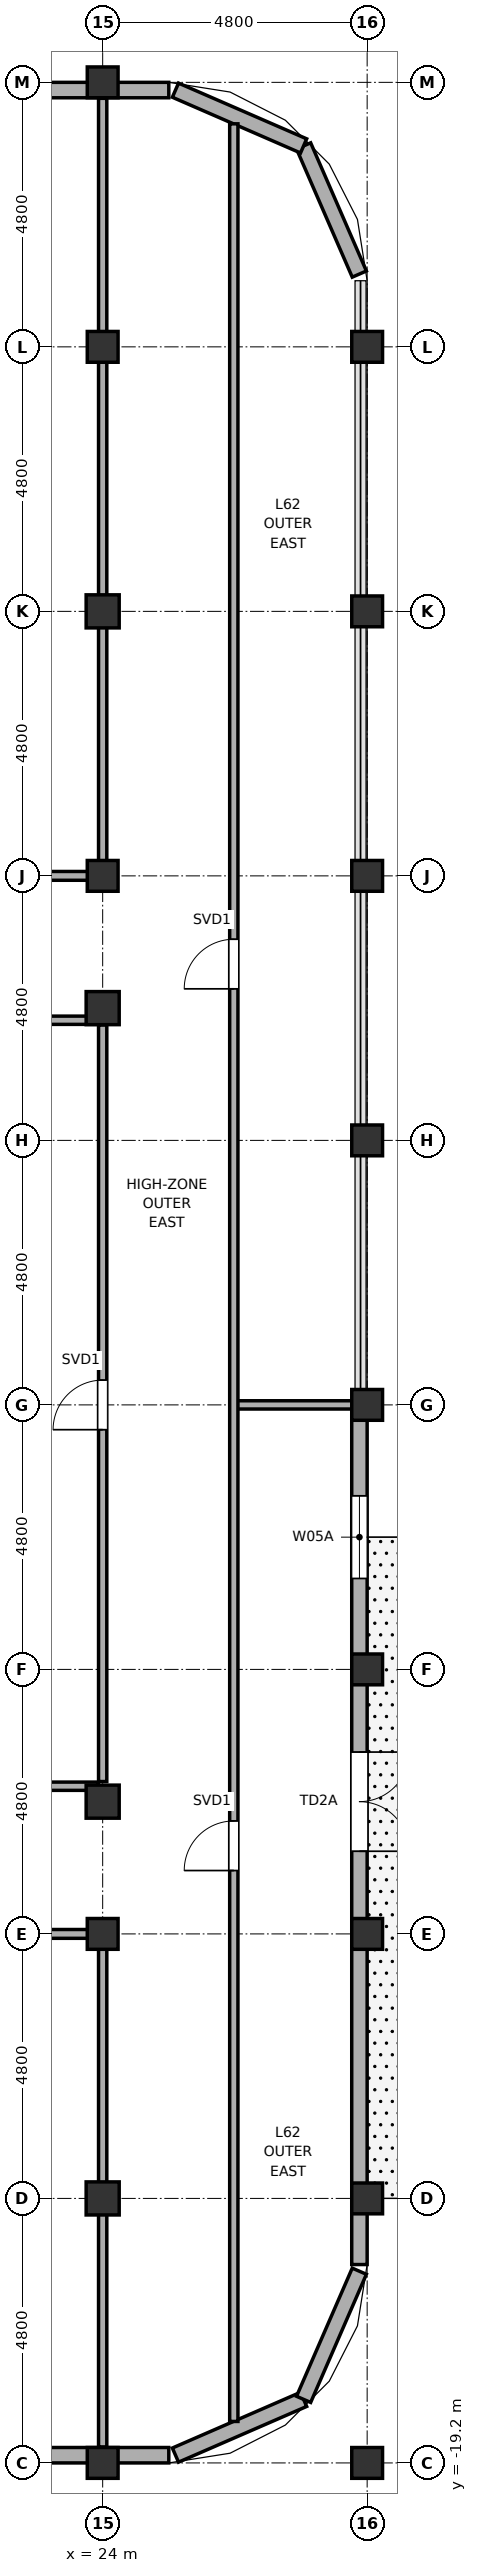
"""IFC4 building model, lengths in metres.
Left out: names, types, materials, properties, quantities, classifications, styles, units other than length and angle.
Written with IfcOpenShell. Run it as: python <this file> out.ifc"""

import sys

from ifc_helpers import new_model, si_unit, direction, frame, frame_2d, origin, origin_2d, place, context, subcontext, project, spatial, rectangle, hollow_rectangle, hollow_circle, extrude, element, fill, save


model = new_model("IFC4")
c1 = context("Model", 3, precision=1e-05, world=origin(), true_north=direction((0.0, 1.0)))
c2 = subcontext(c1, "Body", "Model", "MODEL_VIEW")
j1 = project(units=[si_unit("LENGTHUNIT", "METRE"), si_unit("PLANEANGLEUNIT", "RADIAN")], contexts=[c1])
p1 = place(None, origin())
s1 = spatial("IfcSite", under=j1, at=p1, CompositionType="ELEMENT")
p2 = place(p1, origin())
s2 = spatial("IfcBuilding", under=s1, at=p2, CompositionType="ELEMENT")
p3 = place(p2, frame((0.0, 0.0, 249.25)))
s3 = spatial("IfcBuildingStorey", under=s2, at=p3, CompositionType="ELEMENT", Elevation=249.25)
p4 = place(p3, frame((24.0, -19.2, 0.0), z_axis=(0.0, 0.0, 1.0), x_axis=(1.0, 0.0, 0.0)))
e1 = element("IfcColumn", 1, at=p4, inside=s3, PredefinedType="COLUMN", context=c2, shape_type="SweptSolid", body=[
    extrude(hollow_circle(Radius=0.28, WallThickness=0.025, at=origin_2d()), origin(), (0.0, 0.0, 1.0), 3.85),
])
p5 = place(p3, frame((24.0, -14.4, 0.0), z_axis=(0.0, 0.0, 1.0), x_axis=(1.0, 0.0, 0.0)))
e2 = element("IfcColumn", 2, at=p5, inside=s3, PredefinedType="COLUMN", context=c2, shape_type="SweptSolid", body=[
    extrude(hollow_rectangle(XDim=0.6, YDim=0.6, WallThickness=0.028, at=origin_2d()), origin(), (0.0, 0.0, 1.0), 3.85),
])
p6 = place(p3, frame((24.0, -9.6, 0.0), z_axis=(0.0, 0.0, 1.0), x_axis=(1.0, 0.0, 0.0)))
e3 = element("IfcColumn", 3, at=p6, inside=s3, PredefinedType="COLUMN", context=c2, shape_type="SweptSolid", body=[
    extrude(hollow_circle(Radius=0.28, WallThickness=0.025, at=origin_2d()), origin(), (0.0, 0.0, 1.0), 3.85),
])
for number, where, z_axis, x_axis in (
    (4, (24.0, -7.2, 0.0), (0.0, 0.0, 1.0), (1.0, 0.0, 0.0)),
    (5, (24.0, 7.2, 0.0), (0.0, 0.0, 1.0), (1.0, 0.0, 0.0)),
):
    element("IfcColumn", number, at=place(p3, frame(where, z_axis=z_axis, x_axis=x_axis)), inside=s3, PredefinedType="COLUMN", context=c2, shape_type="SweptSolid", body=[
        extrude(hollow_rectangle(XDim=0.6, YDim=0.6, WallThickness=0.028, at=origin_2d()), origin(), (0.0, 0.0, 1.0), 3.85),
    ])
p7 = place(p3, frame((24.0, 9.6, 0.0), z_axis=(0.0, 0.0, 1.0), x_axis=(1.0, 0.0, 0.0)))
e6 = element("IfcColumn", 6, at=p7, inside=s3, PredefinedType="COLUMN", context=c2, shape_type="SweptSolid", body=[
    extrude(hollow_circle(Radius=0.28, WallThickness=0.025, at=origin_2d()), origin(), (0.0, 0.0, 1.0), 3.85),
])
p8 = place(p3, frame((24.0, 14.4, 0.0), z_axis=(0.0, 0.0, 1.0), x_axis=(1.0, 0.0, 0.0)))
e7 = element("IfcColumn", 7, at=p8, inside=s3, PredefinedType="COLUMN", context=c2, shape_type="SweptSolid", body=[
    extrude(hollow_rectangle(XDim=0.6, YDim=0.6, WallThickness=0.028, at=origin_2d()), origin(), (0.0, 0.0, 1.0), 3.85),
])
for number, where, z_axis, x_axis in (
    (8, (24.0, 19.2, 0.0), (0.0, 0.0, 1.0), (1.0, 0.0, 0.0)),
    (9, (24.0, 24.0, 0.0), (0.0, 0.0, 1.0), (1.0, 0.0, 0.0)),
    (10, (28.8, -19.2, 0.0), (0.0, 0.0, 1.0), (1.0, 0.0, 0.0)),
    (11, (28.8, -14.4, 0.0), (0.0, 0.0, 1.0), (1.0, 0.0, 0.0)),
    (12, (28.8, -9.6, 0.0), (0.0, 0.0, 1.0), (1.0, 0.0, 0.0)),
    (13, (28.8, -4.8, 0.0), (0.0, 0.0, 1.0), (1.0, 0.0, 0.0)),
    (14, (28.8, 0.0, 0.0), (0.0, 0.0, 1.0), (1.0, 0.0, 0.0)),
    (15, (28.8, 4.8, 0.0), (0.0, 0.0, 1.0), (1.0, 0.0, 0.0)),
    (16, (28.8, 9.6, 0.0), (0.0, 0.0, 1.0), (1.0, 0.0, 0.0)),
    (17, (28.8, 14.4, 0.0), (0.0, 0.0, 1.0), (1.0, 0.0, 0.0)),
    (18, (28.8, 19.2, 0.0), (0.0, 0.0, 1.0), (1.0, 0.0, 0.0)),
):
    element("IfcColumn", number, at=place(p3, frame(where, z_axis=z_axis, x_axis=x_axis)), inside=s3, PredefinedType="COLUMN", context=c2, shape_type="SweptSolid", body=[
        extrude(hollow_circle(Radius=0.28, WallThickness=0.025, at=origin_2d()), origin(), (0.0, 0.0, 1.0), 3.85),
    ])
p9 = place(p3, frame((25.321, -19.058, 0.0), z_axis=(0.0, 0.0, 1.0), x_axis=(0.917060872934, 0.398747232384, 0.0)))
e19 = element("IfcWall", 19, at=p9, inside=s3, PredefinedType="SOLIDWALL", context=c2, shape_type="SweptSolid", body=[
    extrude(rectangle(XDim=2.536, YDim=0.28, at=frame_2d((1.268, 0.0))), origin(), (0.0, 0.0, 1.0), 2.27),
])
p10 = place(p3, frame((27.646, -18.047, 0.0), z_axis=(0.0, 0.0, 1.0), x_axis=(0.398792985289, 0.917040977756, 0.0)))
e20 = element("IfcWall", 20, at=p10, inside=s3, PredefinedType="SOLIDWALL", context=c2, shape_type="SweptSolid", body=[
    extrude(rectangle(XDim=2.536, YDim=0.28, at=frame_2d((1.268, 0.0))), origin(), (0.0, 0.0, 1.0), 3.02),
])
p11 = place(p3, frame((28.658, 20.521, 0.0), z_axis=(0.0, 0.0, 1.0), x_axis=(-0.398792985289, 0.917040977756, 0.0)))
e21 = element("IfcWall", 21, at=p11, inside=s3, PredefinedType="SOLIDWALL", context=c2, shape_type="SweptSolid", body=[
    extrude(rectangle(XDim=2.536, YDim=0.28, at=frame_2d((1.268, 0.0))), origin(), (0.0, 0.0, 1.0), 2.27),
])
p12 = place(p3, frame((27.646, 22.847, 0.0), z_axis=(0.0, 0.0, 1.0), x_axis=(-0.917060872934, 0.398747232384, 0.0)))
e22 = element("IfcWall", 22, at=p12, inside=s3, PredefinedType="SOLIDWALL", context=c2, shape_type="SweptSolid", body=[
    extrude(rectangle(XDim=2.536, YDim=0.28, at=frame_2d((1.268, 0.0))), origin(), (0.0, 0.0, 1.0), 2.27),
])
p13 = place(p3, frame((4.75, -19.06, 0.0), z_axis=(0.0, 0.0, 1.0), x_axis=(1.0, 0.0, 0.0)))
e23 = element("IfcWall", 23, at=p13, inside=s3, PredefinedType="SOLIDWALL", context=c2, shape_type="SweptSolid", body=[
    extrude(rectangle(XDim=20.45, YDim=0.28, at=frame_2d((10.225, 0.0))), origin(), (0.0, 0.0, 1.0), 2.27),
])
p14 = place(p13, frame((1.89, 0.0, 0.75)))
e24 = element("IfcOpeningElement", 24, at=p14, cuts=e23, PredefinedType="OPENING", context=c2, shape_type="SweptSolid", body=[
    extrude(rectangle(XDim=1.2, YDim=1.15, at=frame_2d((0.6, 0.575))), frame((0.0, 0.155, 0.0), z_axis=(0.0, -1.0, 0.0), x_axis=(1.0, 0.0, 0.0)), (0.0, 0.0, 1.0), 0.31),
])
p15 = place(p13, frame((6.61, 0.0, 0.75)))
e25 = element("IfcOpeningElement", 25, at=p15, cuts=e23, PredefinedType="OPENING", context=c2, shape_type="SweptSolid", body=[
    extrude(rectangle(XDim=1.2, YDim=1.15, at=frame_2d((0.6, 0.575))), frame((0.0, 0.155, 0.0), z_axis=(0.0, -1.0, 0.0), x_axis=(1.0, 0.0, 0.0)), (0.0, 0.0, 1.0), 0.31),
])
p16 = place(p13, frame((11.45, 0.0, 0.75)))
e26 = element("IfcOpeningElement", 26, at=p16, cuts=e23, PredefinedType="OPENING", context=c2, shape_type="SweptSolid", body=[
    extrude(rectangle(XDim=1.2, YDim=1.15, at=frame_2d((0.6, 0.575))), frame((0.0, 0.155, 0.0), z_axis=(0.0, -1.0, 0.0), x_axis=(1.0, 0.0, 0.0)), (0.0, 0.0, 1.0), 0.31),
])
p17 = place(p3, frame((4.75, 23.86, 0.0), z_axis=(0.0, 0.0, 1.0), x_axis=(1.0, 0.0, 0.0)))
e27 = element("IfcWall", 27, at=p17, inside=s3, PredefinedType="SOLIDWALL", context=c2, shape_type="SweptSolid", body=[
    extrude(rectangle(XDim=20.45, YDim=0.28, at=frame_2d((10.225, 0.0))), origin(), (0.0, 0.0, 1.0), 2.27),
])
p18 = place(p17, frame((11.45, 0.0, 0.75)))
e28 = element("IfcOpeningElement", 28, at=p18, cuts=e27, PredefinedType="OPENING", context=c2, shape_type="SweptSolid", body=[
    extrude(rectangle(XDim=1.2, YDim=1.15, at=frame_2d((0.6, 0.575))), frame((0.0, 0.155, 0.0), z_axis=(0.0, -1.0, 0.0), x_axis=(1.0, 0.0, 0.0)), (0.0, 0.0, 1.0), 0.31),
])
p19 = place(p3, frame((28.66, -15.6, 0.0), z_axis=(0.0, 0.0, 1.0), x_axis=(0.0, 1.0, 0.0)))
e29 = element("IfcWall", 29, at=p19, inside=s3, PredefinedType="SOLIDWALL", context=c2, shape_type="SweptSolid", body=[
    extrude(rectangle(XDim=15.58, YDim=0.28, at=frame_2d((7.79, 0.0))), origin(), (0.0, 0.0, 1.0), 2.27),
])
p20 = place(p19, frame((7.5, 0.0, 0.0)))
e30 = element("IfcOpeningElement", 30, at=p20, cuts=e29, PredefinedType="OPENING", context=c2, shape_type="SweptSolid", body=[
    extrude(rectangle(XDim=1.8, YDim=2.02, at=frame_2d((0.9, 1.01))), frame((0.0, 0.155, 0.0), z_axis=(0.0, -1.0, 0.0), x_axis=(1.0, 0.0, 0.0)), (0.0, 0.0, 1.0), 0.31),
])
p21 = place(p19, frame((12.45, 0.0, 0.75)))
e31 = element("IfcOpeningElement", 31, at=p21, cuts=e29, PredefinedType="OPENING", context=c2, shape_type="SweptSolid", body=[
    extrude(rectangle(XDim=1.5, YDim=1.15, at=frame_2d((0.75, 0.575))), frame((0.0, 0.155, 0.0), z_axis=(0.0, -1.0, 0.0), x_axis=(1.0, 0.0, 0.0)), (0.0, 0.0, 1.0), 0.31),
])
p22 = place(p3, frame((-23.92, -9.6, 0.0), z_axis=(0.0, 0.0, 1.0), x_axis=(1.0, 0.0, 0.0)))
e32 = element("IfcWall", 32, at=p22, inside=s3, PredefinedType="PARTITIONING", context=c2, shape_type="SweptSolid", body=[
    extrude(rectangle(XDim=47.84, YDim=0.16, at=frame_2d((23.92, 0.0))), origin(), (0.0, 0.0, 1.0), 2.27),
])
p23 = place(p22, frame((1.87, 0.0, 0.0)))
e33 = element("IfcOpeningElement", 33, at=p23, cuts=e32, PredefinedType="OPENING", context=c2, shape_type="SweptSolid", body=[
    extrude(rectangle(XDim=0.9, YDim=2.1, at=frame_2d((0.45, 1.05))), frame((0.0, 0.095, 0.0), z_axis=(0.0, -1.0, 0.0), x_axis=(1.0, 0.0, 0.0)), (0.0, 0.0, 1.0), 0.19),
])
p24 = place(p22, frame((45.07, 0.0, 0.0)))
e34 = element("IfcOpeningElement", 34, at=p24, cuts=e32, PredefinedType="OPENING", context=c2, shape_type="SweptSolid", body=[
    extrude(rectangle(XDim=0.9, YDim=2.1, at=frame_2d((0.45, 1.05))), frame((0.0, 0.095, 0.0), z_axis=(0.0, -1.0, 0.0), x_axis=(1.0, 0.0, 0.0)), (0.0, 0.0, 1.0), 0.19),
])
p25 = place(p22, frame((6.67, 0.0, 0.0)))
e35 = element("IfcOpeningElement", 35, at=p25, cuts=e32, PredefinedType="OPENING", context=c2, shape_type="SweptSolid", body=[
    extrude(rectangle(XDim=0.9, YDim=2.1, at=frame_2d((0.45, 1.05))), frame((0.0, 0.095, 0.0), z_axis=(0.0, -1.0, 0.0), x_axis=(1.0, 0.0, 0.0)), (0.0, 0.0, 1.0), 0.19),
])
p26 = place(p22, frame((11.47, 0.0, 0.0)))
e36 = element("IfcOpeningElement", 36, at=p26, cuts=e32, PredefinedType="OPENING", context=c2, shape_type="SweptSolid", body=[
    extrude(rectangle(XDim=0.9, YDim=2.1, at=frame_2d((0.45, 1.05))), frame((0.0, 0.095, 0.0), z_axis=(0.0, -1.0, 0.0), x_axis=(1.0, 0.0, 0.0)), (0.0, 0.0, 1.0), 0.19),
])
p27 = place(p22, frame((16.27, 0.0, 0.0)))
e37 = element("IfcOpeningElement", 37, at=p27, cuts=e32, PredefinedType="OPENING", context=c2, shape_type="SweptSolid", body=[
    extrude(rectangle(XDim=0.9, YDim=2.1, at=frame_2d((0.45, 1.05))), frame((0.0, 0.095, 0.0), z_axis=(0.0, -1.0, 0.0), x_axis=(1.0, 0.0, 0.0)), (0.0, 0.0, 1.0), 0.19),
])
p28 = place(p22, frame((21.07, 0.0, 0.0)))
e38 = element("IfcOpeningElement", 38, at=p28, cuts=e32, PredefinedType="OPENING", context=c2, shape_type="SweptSolid", body=[
    extrude(rectangle(XDim=0.9, YDim=2.1, at=frame_2d((0.45, 1.05))), frame((0.0, 0.095, 0.0), z_axis=(0.0, -1.0, 0.0), x_axis=(1.0, 0.0, 0.0)), (0.0, 0.0, 1.0), 0.19),
])
p29 = place(p22, frame((25.87, 0.0, 0.0)))
e39 = element("IfcOpeningElement", 39, at=p29, cuts=e32, PredefinedType="OPENING", context=c2, shape_type="SweptSolid", body=[
    extrude(rectangle(XDim=0.9, YDim=2.1, at=frame_2d((0.45, 1.05))), frame((0.0, 0.095, 0.0), z_axis=(0.0, -1.0, 0.0), x_axis=(1.0, 0.0, 0.0)), (0.0, 0.0, 1.0), 0.19),
])
p30 = place(p22, frame((30.635, 0.0, 0.0)))
e40 = element("IfcOpeningElement", 40, at=p30, cuts=e32, PredefinedType="OPENING", context=c2, shape_type="SweptSolid", body=[
    extrude(rectangle(XDim=1.05, YDim=2.2, at=frame_2d((0.525, 1.1))), frame((0.0, 0.095, 0.0), z_axis=(0.0, -1.0, 0.0), x_axis=(1.0, 0.0, 0.0)), (0.0, 0.0, 1.0), 0.19),
])
p31 = place(p22, frame((40.83, 0.0, 0.0)))
e41 = element("IfcOpeningElement", 41, at=p31, cuts=e32, PredefinedType="OPENING", context=c2, shape_type="SweptSolid", body=[
    extrude(rectangle(XDim=0.92, YDim=2.15, at=frame_2d((0.46, 1.075))), frame((0.0, 0.095, 0.0), z_axis=(0.0, -1.0, 0.0), x_axis=(1.0, 0.0, 0.0)), (0.0, 0.0, 1.0), 0.19),
])
p32 = place(p3, frame((14.52, -6.92, 0.0), z_axis=(0.0, 0.0, 1.0), x_axis=(1.0, 0.0, 0.0)))
e42 = element("IfcWall", 42, at=p32, inside=s3, PredefinedType="PARTITIONING", context=c2, shape_type="SweptSolid", body=[
    extrude(rectangle(XDim=9.4, YDim=0.15, at=frame_2d((4.7, 0.0))), origin(), (0.0, 0.0, 1.0), 2.27),
])
p33 = place(p3, frame((26.38, 0.0, 0.0), z_axis=(0.0, 0.0, 1.0), x_axis=(1.0, 0.0, 0.0)))
e43 = element("IfcWall", 43, at=p33, inside=s3, PredefinedType="PARTITIONING", context=c2, shape_type="SweptSolid", body=[
    extrude(rectangle(XDim=2.25, YDim=0.15, at=frame_2d((1.125, 0.0))), origin(), (0.0, 0.0, 1.0), 3.12),
])
p34 = place(p3, frame((14.52, 6.98, 0.0), z_axis=(0.0, 0.0, 1.0), x_axis=(1.0, 0.0, 0.0)))
e44 = element("IfcWall", 44, at=p34, inside=s3, PredefinedType="PARTITIONING", context=c2, shape_type="SweptSolid", body=[
    extrude(rectangle(XDim=9.4, YDim=0.15, at=frame_2d((4.7, 0.0))), origin(), (0.0, 0.0, 1.0), 2.27),
])
p35 = place(p3, frame((-23.92, 9.6, 0.0), z_axis=(0.0, 0.0, 1.0), x_axis=(1.0, 0.0, 0.0)))
e45 = element("IfcWall", 45, at=p35, inside=s3, PredefinedType="PARTITIONING", context=c2, shape_type="SweptSolid", body=[
    extrude(rectangle(XDim=47.84, YDim=0.16, at=frame_2d((23.92, 0.0))), origin(), (0.0, 0.0, 1.0), 2.27),
])
p36 = place(p35, frame((1.87, 0.0, 0.0)))
e46 = element("IfcOpeningElement", 46, at=p36, cuts=e45, PredefinedType="OPENING", context=c2, shape_type="SweptSolid", body=[
    extrude(rectangle(XDim=0.9, YDim=2.1, at=frame_2d((0.45, 1.05))), frame((0.0, 0.095, 0.0), z_axis=(0.0, -1.0, 0.0), x_axis=(1.0, 0.0, 0.0)), (0.0, 0.0, 1.0), 0.19),
])
p37 = place(p35, frame((45.07, 0.0, 0.0)))
e47 = element("IfcOpeningElement", 47, at=p37, cuts=e45, PredefinedType="OPENING", context=c2, shape_type="SweptSolid", body=[
    extrude(rectangle(XDim=0.9, YDim=2.1, at=frame_2d((0.45, 1.05))), frame((0.0, 0.095, 0.0), z_axis=(0.0, -1.0, 0.0), x_axis=(1.0, 0.0, 0.0)), (0.0, 0.0, 1.0), 0.19),
])
p38 = place(p35, frame((5.98, 0.0, 0.0)))
e48 = element("IfcOpeningElement", 48, at=p38, cuts=e45, PredefinedType="OPENING", context=c2, shape_type="SweptSolid", body=[
    extrude(rectangle(XDim=0.9, YDim=2.1, at=frame_2d((0.45, 1.05))), frame((0.0, 0.095, 0.0), z_axis=(0.0, -1.0, 0.0), x_axis=(1.0, 0.0, 0.0)), (0.0, 0.0, 1.0), 0.19),
])
p39 = place(p35, frame((7.87, 0.0, 0.0)))
e49 = element("IfcOpeningElement", 49, at=p39, cuts=e45, PredefinedType="OPENING", context=c2, shape_type="SweptSolid", body=[
    extrude(rectangle(XDim=0.9, YDim=2.1, at=frame_2d((0.45, 1.05))), frame((0.0, 0.095, 0.0), z_axis=(0.0, -1.0, 0.0), x_axis=(1.0, 0.0, 0.0)), (0.0, 0.0, 1.0), 0.19),
])
p40 = place(p35, frame((10.395, 0.0, 0.0)))
e50 = element("IfcOpeningElement", 50, at=p40, cuts=e45, PredefinedType="OPENING", context=c2, shape_type="SweptSolid", body=[
    extrude(rectangle(XDim=0.92, YDim=2.15, at=frame_2d((0.46, 1.075))), frame((0.0, 0.095, 0.0), z_axis=(0.0, -1.0, 0.0), x_axis=(1.0, 0.0, 0.0)), (0.0, 0.0, 1.0), 0.19),
])
p41 = place(p35, frame((17.325, 0.0, 0.0)))
e51 = element("IfcOpeningElement", 51, at=p41, cuts=e45, PredefinedType="OPENING", context=c2, shape_type="SweptSolid", body=[
    extrude(rectangle(XDim=0.92, YDim=2.15, at=frame_2d((0.46, 1.075))), frame((0.0, 0.095, 0.0), z_axis=(0.0, -1.0, 0.0), x_axis=(1.0, 0.0, 0.0)), (0.0, 0.0, 1.0), 0.19),
])
p42 = place(p35, frame((19.995, 0.0, 0.0)))
e52 = element("IfcOpeningElement", 52, at=p42, cuts=e45, PredefinedType="OPENING", context=c2, shape_type="SweptSolid", body=[
    extrude(rectangle(XDim=0.92, YDim=2.15, at=frame_2d((0.46, 1.075))), frame((0.0, 0.095, 0.0), z_axis=(0.0, -1.0, 0.0), x_axis=(1.0, 0.0, 0.0)), (0.0, 0.0, 1.0), 0.19),
])
p43 = place(p35, frame((25.87, 0.0, 0.0)))
e53 = element("IfcOpeningElement", 53, at=p43, cuts=e45, PredefinedType="OPENING", context=c2, shape_type="SweptSolid", body=[
    extrude(rectangle(XDim=0.9, YDim=2.1, at=frame_2d((0.45, 1.05))), frame((0.0, 0.095, 0.0), z_axis=(0.0, -1.0, 0.0), x_axis=(1.0, 0.0, 0.0)), (0.0, 0.0, 1.0), 0.19),
])
p44 = place(p35, frame((40.83, 0.0, 0.0)))
e54 = element("IfcOpeningElement", 54, at=p44, cuts=e45, PredefinedType="OPENING", context=c2, shape_type="SweptSolid", body=[
    extrude(rectangle(XDim=0.92, YDim=2.15, at=frame_2d((0.46, 1.075))), frame((0.0, 0.095, 0.0), z_axis=(0.0, -1.0, 0.0), x_axis=(1.0, 0.0, 0.0)), (0.0, 0.0, 1.0), 0.19),
])
p45 = place(p3, frame((24.0, -18.91, 0.0), z_axis=(0.0, 0.0, 1.0), x_axis=(0.0, 1.0, 0.0)))
e55 = element("IfcWall", 55, at=p45, inside=s3, PredefinedType="PARTITIONING", context=c2, shape_type="SweptSolid", body=[
    extrude(rectangle(XDim=9.19, YDim=0.15, at=frame_2d((4.595, 0.0))), origin(), (0.0, 0.0, 1.0), 2.27),
])
p46 = place(p3, frame((24.0, -6.835, 0.0), z_axis=(0.0, 0.0, 1.0), x_axis=(0.0, 1.0, 0.0)))
e56 = element("IfcWall", 56, at=p46, inside=s3, PredefinedType="PARTITIONING", context=c2, shape_type="SweptSolid", body=[
    extrude(rectangle(XDim=13.73, YDim=0.15, at=frame_2d((6.865, 0.0))), origin(), (0.0, 0.0, 1.0), 2.27),
])
p47 = place(p46, frame((6.385, 0.0, 0.0)))
e57 = element("IfcOpeningElement", 57, at=p47, cuts=e56, PredefinedType="OPENING", context=c2, shape_type="SweptSolid", body=[
    extrude(rectangle(XDim=0.9, YDim=2.1, at=frame_2d((0.45, 1.05))), frame((0.0, 0.09, 0.0), z_axis=(0.0, -1.0, 0.0), x_axis=(1.0, 0.0, 0.0)), (0.0, 0.0, 1.0), 0.18),
])
p48 = place(p3, frame((24.0, 9.72, 0.0), z_axis=(0.0, 0.0, 1.0), x_axis=(0.0, 1.0, 0.0)))
e58 = element("IfcWall", 58, at=p48, inside=s3, PredefinedType="PARTITIONING", context=c2, shape_type="SweptSolid", body=[
    extrude(rectangle(XDim=13.99, YDim=0.15, at=frame_2d((6.995, 0.0))), origin(), (0.0, 0.0, 1.0), 2.27),
])
p49 = place(p3, frame((26.38, -18.447, 0.0), z_axis=(0.0, 0.0, 1.0), x_axis=(0.0, 1.0, 0.0)))
e59 = element("IfcWall", 59, at=p49, inside=s3, PredefinedType="PARTITIONING", context=c2, shape_type="SweptSolid", body=[
    extrude(rectangle(XDim=41.695, YDim=0.15, at=frame_2d((20.847, 0.0))), origin(), (0.0, 0.0, 1.0), 2.27),
])
p50 = place(p49, frame((9.997, 0.0, 0.0)))
e60 = element("IfcOpeningElement", 60, at=p50, cuts=e59, PredefinedType="OPENING", context=c2, shape_type="SweptSolid", body=[
    extrude(rectangle(XDim=0.9, YDim=2.1, at=frame_2d((0.45, 1.05))), frame((0.0, 0.09, 0.0), z_axis=(0.0, -1.0, 0.0), x_axis=(1.0, 0.0, 0.0)), (0.0, 0.0, 1.0), 0.18),
])
p51 = place(p49, frame((25.997, 0.0, 0.0)))
e61 = element("IfcOpeningElement", 61, at=p51, cuts=e59, PredefinedType="OPENING", context=c2, shape_type="SweptSolid", body=[
    extrude(rectangle(XDim=0.9, YDim=2.1, at=frame_2d((0.45, 1.05))), frame((0.0, 0.09, 0.0), z_axis=(0.0, -1.0, 0.0), x_axis=(1.0, 0.0, 0.0)), (0.0, 0.0, 1.0), 0.18),
])
p52 = place(p20, origin())
e62 = element("IfcDoor", 62, at=p52, inside=s3, OperationType="DOUBLE_DOOR_SINGLE_SWING", PredefinedType="DOOR", context=c2, shape_type="SweptSolid", body=[
    extrude(rectangle(XDim=1.8, YDim=2.02, at=frame_2d((0.9, 1.01))), frame((0.0, 0.025, 0.0), z_axis=(0.0, -1.0, 0.0), x_axis=(1.0, 0.0, 0.0)), (0.0, 0.0, 1.0), 0.05),
])
fill(e30, e62)
p53 = place(p21, origin())
e63 = element("IfcWindow", 63, at=p53, inside=s3, PartitioningType="SINGLE_PANEL", PredefinedType="WINDOW", context=c2, shape_type="SweptSolid", body=[
    extrude(rectangle(XDim=1.5, YDim=1.15, at=frame_2d((0.75, 0.575))), frame((0.0, 0.03, 0.0), z_axis=(0.0, -1.0, 0.0), x_axis=(1.0, 0.0, 0.0)), (0.0, 0.0, 1.0), 0.06),
])
fill(e31, e63)
p54 = place(p47, origin())
e64 = element("IfcDoor", 64, at=p54, inside=s3, OperationType="SINGLE_SWING_RIGHT", PredefinedType="DOOR", context=c2, shape_type="SweptSolid", body=[
    extrude(rectangle(XDim=0.9, YDim=2.1, at=frame_2d((0.45, 1.05))), frame((0.0, 0.025, 0.0), z_axis=(0.0, -1.0, 0.0), x_axis=(1.0, 0.0, 0.0)), (0.0, 0.0, 1.0), 0.05),
])
fill(e57, e64)
p55 = place(p50, origin())
e65 = element("IfcDoor", 65, at=p55, inside=s3, OperationType="SINGLE_SWING_RIGHT", PredefinedType="DOOR", context=c2, shape_type="SweptSolid", body=[
    extrude(rectangle(XDim=0.9, YDim=2.1, at=frame_2d((0.45, 1.05))), frame((0.0, 0.025, 0.0), z_axis=(0.0, -1.0, 0.0), x_axis=(1.0, 0.0, 0.0)), (0.0, 0.0, 1.0), 0.05),
])
fill(e60, e65)
p56 = place(p51, origin())
e66 = element("IfcDoor", 66, at=p56, inside=s3, OperationType="SINGLE_SWING_RIGHT", PredefinedType="DOOR", context=c2, shape_type="SweptSolid", body=[
    extrude(rectangle(XDim=0.9, YDim=2.1, at=frame_2d((0.45, 1.05))), frame((0.0, 0.025, 0.0), z_axis=(0.0, -1.0, 0.0), x_axis=(1.0, 0.0, 0.0)), (0.0, 0.0, 1.0), 0.05),
])
fill(e61, e66)
save(model, sys.argv[1])
